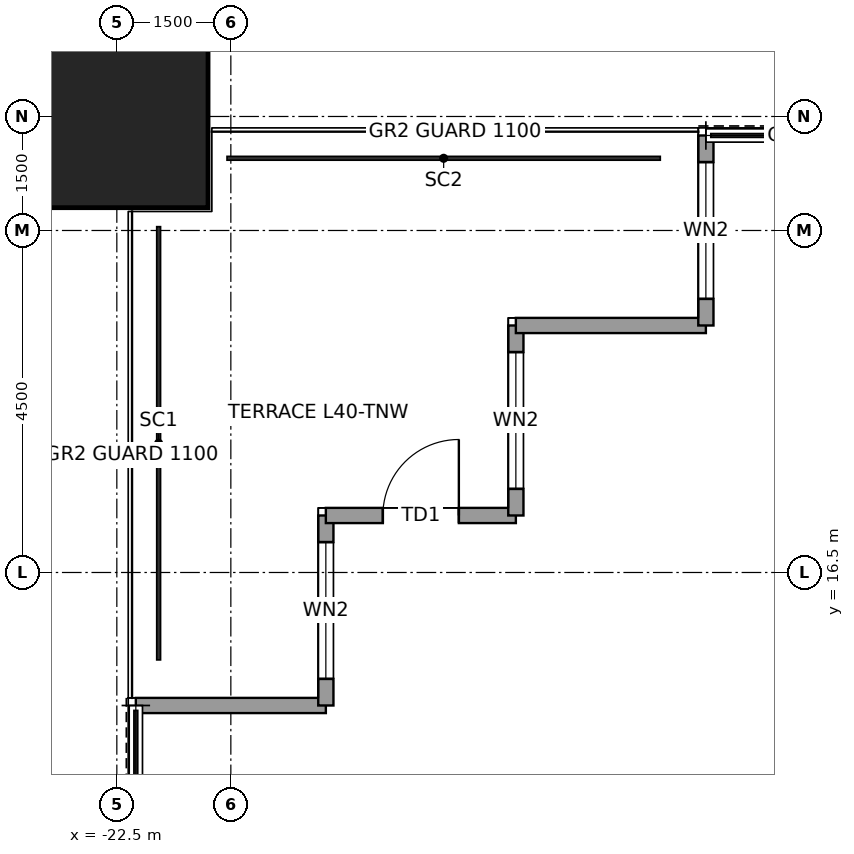
"""IFC4 building model, lengths in metres.
Left out: names, types, materials, properties, quantities, classifications, styles, units other than length and angle.
Written with IfcOpenShell. Run it as: python <this file> out.ifc"""

import sys

from ifc_helpers import new_model, si_unit, direction, frame, frame_2d, origin, origin_2d, place, context, subcontext, project, spatial, rectangle, hollow_rectangle, extrude, element, fill, save


model = new_model("IFC4")
c1 = context("Model", 3, precision=1e-05, world=origin(), true_north=direction((0.0, 1.0)))
c2 = subcontext(c1, "Body", "Model", "MODEL_VIEW")
j1 = project(units=[si_unit("LENGTHUNIT", "METRE"), si_unit("PLANEANGLEUNIT", "RADIAN")], contexts=[c1])
p1 = place(None, origin())
s1 = spatial("IfcSite", under=j1, at=p1, CompositionType="ELEMENT")
p2 = place(p1, origin())
s2 = spatial("IfcBuilding", under=s1, at=p2, CompositionType="ELEMENT")
p3 = place(p2, frame((0.0, 0.0, 193.9)))
s3 = spatial("IfcBuildingStorey", under=s2, at=p3, CompositionType="ELEMENT", Elevation=193.9)
p4 = place(p3, frame((-22.5, 22.5, 0.0), z_axis=(0.0, 0.0, 1.0), x_axis=(1.0, 0.0, 0.0)))
e1 = element("IfcColumn", 1, at=p4, inside=s3, PredefinedType="COLUMN", context=c2, shape_type="SweptSolid", body=[
    extrude(hollow_rectangle(XDim=2.4, YDim=2.4, WallThickness=0.12, at=origin_2d()), origin(), (0.0, 0.0, 1.0), 4.0),
])
p5 = place(p3, frame((-22.25, 14.75, 0.0), z_axis=(0.0, 0.0, 1.0), x_axis=(1.0, 0.0, 0.0)))
e2 = element("IfcWall", 2, at=p5, inside=s3, PredefinedType="SOLIDWALL", context=c2, shape_type="SweptSolid", body=[
    extrude(rectangle(XDim=2.5, YDim=0.2, at=frame_2d((1.25, 0.0))), origin(), (0.0, 0.0, 1.0), 3.85),
])
p6 = place(p3, frame((-19.75, 14.75, 0.0), z_axis=(0.0, 0.0, 1.0), x_axis=(0.0, 1.0, 0.0)))
e3 = element("IfcWall", 3, at=p6, inside=s3, PredefinedType="SOLIDWALL", context=c2, shape_type="SweptSolid", body=[
    extrude(rectangle(XDim=2.5, YDim=0.2, at=frame_2d((1.25, 0.0))), origin(), (0.0, 0.0, 1.0), 3.85),
])
p7 = place(p6, frame((0.35, 0.0, 0.3)))
e4 = element("IfcOpeningElement", 4, at=p7, cuts=e3, PredefinedType="OPENING", context=c2, shape_type="SweptSolid", body=[
    extrude(rectangle(XDim=1.8, YDim=2.4, at=frame_2d((0.9, 1.2))), frame((0.0, 0.11, 0.0), z_axis=(0.0, -1.0, 0.0), x_axis=(1.0, 0.0, 0.0)), (0.0, 0.0, 1.0), 0.22),
])
p8 = place(p3, frame((-19.75, 17.25, 0.0), z_axis=(0.0, 0.0, 1.0), x_axis=(1.0, 0.0, 0.0)))
e5 = element("IfcWall", 5, at=p8, inside=s3, PredefinedType="SOLIDWALL", context=c2, shape_type="SweptSolid", body=[
    extrude(rectangle(XDim=2.5, YDim=0.2, at=frame_2d((1.25, 0.0))), origin(), (0.0, 0.0, 1.0), 3.85),
])
p9 = place(p8, frame((0.75, 0.0, 0.0)))
e6 = element("IfcOpeningElement", 6, at=p9, cuts=e5, PredefinedType="OPENING", context=c2, shape_type="SweptSolid", body=[
    extrude(rectangle(XDim=1.0, YDim=2.4, at=frame_2d((0.5, 1.2))), frame((0.0, 0.11, 0.0), z_axis=(0.0, -1.0, 0.0), x_axis=(1.0, 0.0, 0.0)), (0.0, 0.0, 1.0), 0.22),
])
p10 = place(p3, frame((-17.25, 17.25, 0.0), z_axis=(0.0, 0.0, 1.0), x_axis=(0.0, 1.0, 0.0)))
e7 = element("IfcWall", 7, at=p10, inside=s3, PredefinedType="SOLIDWALL", context=c2, shape_type="SweptSolid", body=[
    extrude(rectangle(XDim=2.5, YDim=0.2, at=frame_2d((1.25, 0.0))), origin(), (0.0, 0.0, 1.0), 3.85),
])
p11 = place(p10, frame((0.35, 0.0, 0.3)))
e8 = element("IfcOpeningElement", 8, at=p11, cuts=e7, PredefinedType="OPENING", context=c2, shape_type="SweptSolid", body=[
    extrude(rectangle(XDim=1.8, YDim=2.4, at=frame_2d((0.9, 1.2))), frame((0.0, 0.11, 0.0), z_axis=(0.0, -1.0, 0.0), x_axis=(1.0, 0.0, 0.0)), (0.0, 0.0, 1.0), 0.22),
])
p12 = place(p3, frame((-17.25, 19.75, 0.0), z_axis=(0.0, 0.0, 1.0), x_axis=(1.0, 0.0, 0.0)))
e9 = element("IfcWall", 9, at=p12, inside=s3, PredefinedType="SOLIDWALL", context=c2, shape_type="SweptSolid", body=[
    extrude(rectangle(XDim=2.5, YDim=0.2, at=frame_2d((1.25, 0.0))), origin(), (0.0, 0.0, 1.0), 3.85),
])
p13 = place(p3, frame((-14.75, 19.75, 0.0), z_axis=(0.0, 0.0, 1.0), x_axis=(0.0, 1.0, 0.0)))
e10 = element("IfcWall", 10, at=p13, inside=s3, PredefinedType="SOLIDWALL", context=c2, shape_type="SweptSolid", body=[
    extrude(rectangle(XDim=2.5, YDim=0.2, at=frame_2d((1.25, 0.0))), origin(), (0.0, 0.0, 1.0), 3.85),
])
p14 = place(p13, frame((0.35, 0.0, 0.3)))
e11 = element("IfcOpeningElement", 11, at=p14, cuts=e10, PredefinedType="OPENING", context=c2, shape_type="SweptSolid", body=[
    extrude(rectangle(XDim=1.8, YDim=2.4, at=frame_2d((0.9, 1.2))), frame((0.0, 0.11, 0.0), z_axis=(0.0, -1.0, 0.0), x_axis=(1.0, 0.0, 0.0)), (0.0, 0.0, 1.0), 0.22),
])
p15 = place(p7, origin())
e12 = element("IfcWindow", 12, at=p15, inside=s3, PartitioningType="SINGLE_PANEL", PredefinedType="WINDOW", context=c2, shape_type="SweptSolid", body=[
    extrude(rectangle(XDim=1.8, YDim=2.4, at=frame_2d((0.9, 1.2))), frame((0.0, 0.03, 0.0), z_axis=(0.0, -1.0, 0.0), x_axis=(1.0, 0.0, 0.0)), (0.0, 0.0, 1.0), 0.06),
])
fill(e4, e12)
p16 = place(p9, origin())
e13 = element("IfcDoor", 13, at=p16, inside=s3, OperationType="SINGLE_SWING_RIGHT", PredefinedType="DOOR", context=c2, shape_type="SweptSolid", body=[
    extrude(rectangle(XDim=1.0, YDim=2.4, at=frame_2d((0.5, 1.2))), frame((0.0, 0.025, 0.0), z_axis=(0.0, -1.0, 0.0), x_axis=(1.0, 0.0, 0.0)), (0.0, 0.0, 1.0), 0.05),
])
fill(e6, e13)
p17 = place(p11, origin())
e14 = element("IfcWindow", 14, at=p17, inside=s3, PartitioningType="SINGLE_PANEL", PredefinedType="WINDOW", context=c2, shape_type="SweptSolid", body=[
    extrude(rectangle(XDim=1.8, YDim=2.4, at=frame_2d((0.9, 1.2))), frame((0.0, 0.03, 0.0), z_axis=(0.0, -1.0, 0.0), x_axis=(1.0, 0.0, 0.0)), (0.0, 0.0, 1.0), 0.06),
])
fill(e8, e14)
p18 = place(p14, origin())
e15 = element("IfcWindow", 15, at=p18, inside=s3, PartitioningType="SINGLE_PANEL", PredefinedType="WINDOW", context=c2, shape_type="SweptSolid", body=[
    extrude(rectangle(XDim=1.8, YDim=2.4, at=frame_2d((0.9, 1.2))), frame((0.0, 0.03, 0.0), z_axis=(0.0, -1.0, 0.0), x_axis=(1.0, 0.0, 0.0)), (0.0, 0.0, 1.0), 0.06),
])
fill(e11, e15)
save(model, sys.argv[1])
